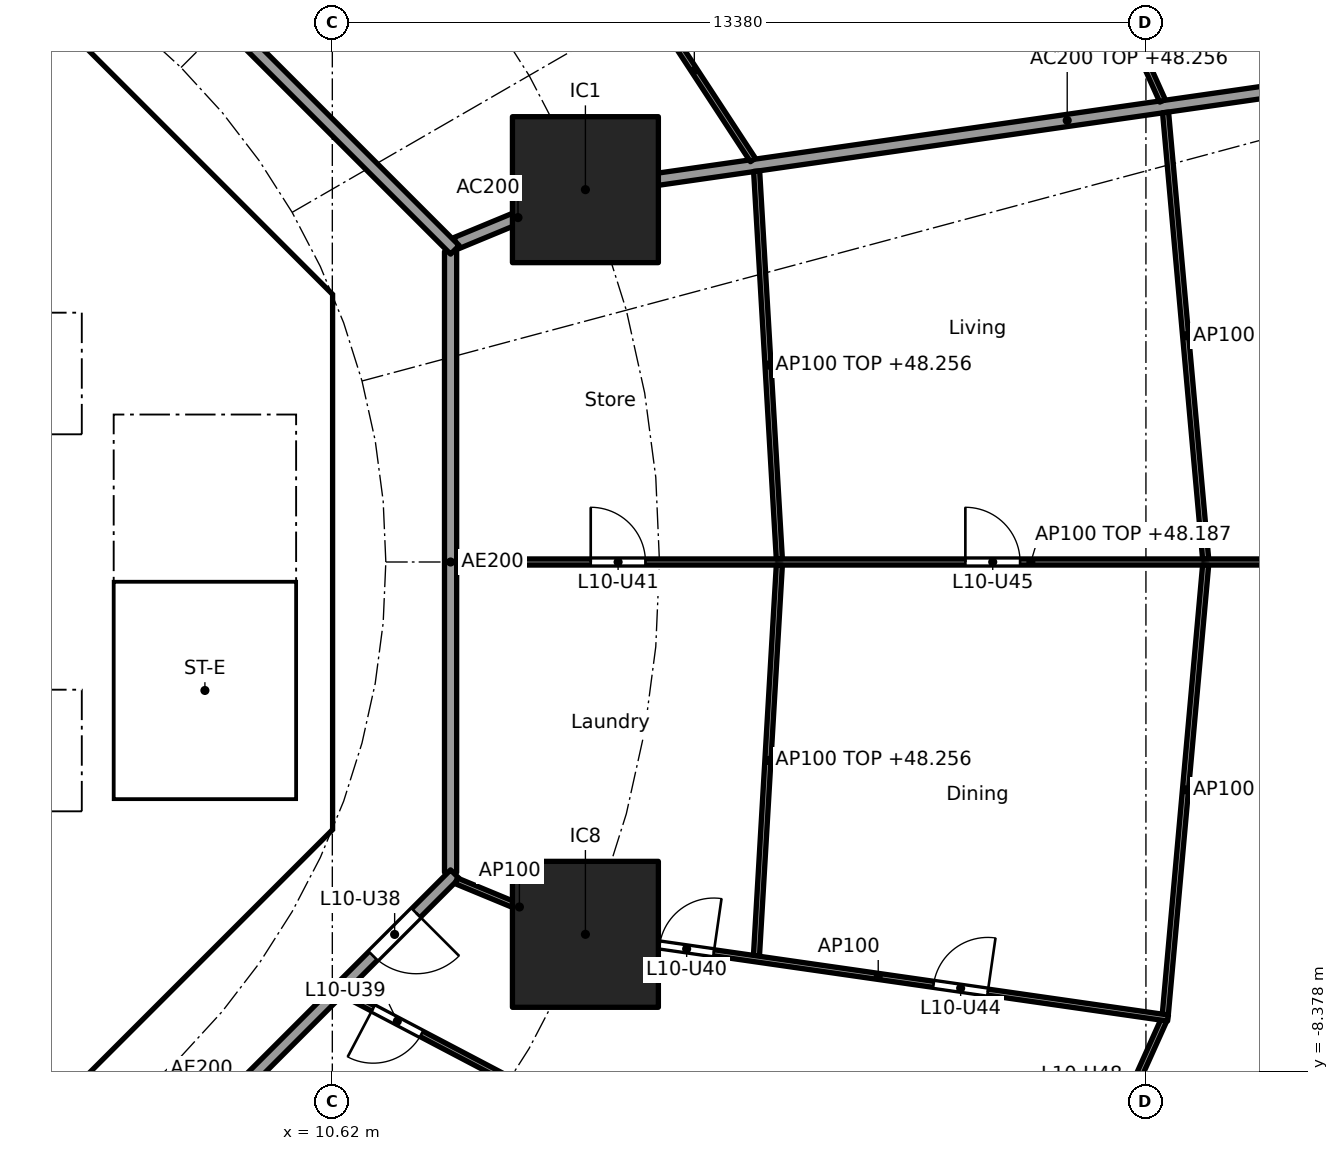
"""IFC4 building model, lengths in metres.
Left out: names, types, materials, properties, quantities, classifications, styles, units other than length and angle.
Written with IfcOpenShell. Run it as: python <this file> out.ifc"""

import sys

from ifc_helpers import new_model, si_unit, direction, frame, frame_2d, origin, origin_2d, place, context, subcontext, project, spatial, polyline, rectangle, outline, extrude, element, fill, save


model = new_model("IFC4")
c1 = context("Model", 3, precision=1e-05, world=origin(), true_north=direction((0.0, 1.0)))
c2 = subcontext(c1, "Body", "Model", "MODEL_VIEW")
j1 = project(units=[si_unit("LENGTHUNIT", "METRE"), si_unit("PLANEANGLEUNIT", "RADIAN")], contexts=[c1])
p1 = place(None, origin())
s1 = spatial("IfcSite", under=j1, at=p1, CompositionType="ELEMENT")
p2 = place(p1, origin())
s2 = spatial("IfcBuilding", under=s1, at=p2, CompositionType="ELEMENT")
p3 = place(p2, frame((0.0, 0.0, 45.5)))
s3 = spatial("IfcBuildingStorey", under=s2, at=p3, CompositionType="ELEMENT", Elevation=45.5)
for number, where, z_axis, x_axis in (
    (1, (14.782, 6.123, 0.0), (0.0, 0.0, 1.0), (1.0, 0.0, 0.0)),
    (2, (14.782, -6.123, 0.0), (0.0, 0.0, 1.0), (1.0, 0.0, 0.0)),
):
    element("IfcColumn", number, at=place(p3, frame(where, z_axis=z_axis, x_axis=x_axis)), inside=s3, PredefinedType="COLUMN", context=c2, shape_type="SweptSolid", body=[
        extrude(rectangle(XDim=2.4, YDim=2.4, at=origin_2d()), origin(), (0.0, 0.0, 1.0), 3.7),
    ])
p4 = place(p3, frame((9.988, 4.613, 0.0), z_axis=(0.0, 0.0, 1.0), x_axis=(-0.707106781187, 0.707106781187, 0.0)))
e3 = element("IfcWall", 3, at=p4, inside=s3, PredefinedType="SHEAR", context=c2, shape_type="SweptSolid", body=[
    extrude(rectangle(XDim=7.602, YDim=0.6, at=frame_2d((3.801, 0.0))), origin(), (0.0, 0.0, 1.0), 3.44),
])
p5 = place(p4, frame((3.201, 0.0, 0.0)))
e4 = element("IfcOpeningElement", 4, at=p5, cuts=e3, PredefinedType="OPENING", context=c2, shape_type="SweptSolid", body=[
    extrude(rectangle(XDim=1.2, YDim=2.1, at=frame_2d((0.6, 1.05))), frame((0.0, 0.31, 0.0), z_axis=(0.0, -1.0, 0.0), x_axis=(1.0, 0.0, 0.0)), (0.0, 0.0, 1.0), 0.62),
])
p6 = place(p3, frame((4.613, -9.988, 0.0), z_axis=(0.0, 0.0, 1.0), x_axis=(0.707106781187, 0.707106781187, 0.0)))
e5 = element("IfcWall", 5, at=p6, inside=s3, PredefinedType="SHEAR", context=c2, shape_type="SweptSolid", body=[
    extrude(rectangle(XDim=7.602, YDim=0.6, at=frame_2d((3.801, 0.0))), origin(), (0.0, 0.0, 1.0), 3.44),
])
p7 = place(p6, frame((3.201, 0.0, 0.0)))
e6 = element("IfcOpeningElement", 6, at=p7, cuts=e5, PredefinedType="OPENING", context=c2, shape_type="SweptSolid", body=[
    extrude(rectangle(XDim=1.2, YDim=2.1, at=frame_2d((0.6, 1.05))), frame((0.0, 0.31, 0.0), z_axis=(0.0, -1.0, 0.0), x_axis=(1.0, 0.0, 0.0)), (0.0, 0.0, 1.0), 0.62),
])
p8 = place(p3, frame((-6.7, 2.0, 0.0), z_axis=(0.0, 0.0, 1.0), x_axis=(1.0, 0.0, 0.0)))
e7 = element("IfcWall", 7, at=p8, inside=s3, PredefinedType="SOLIDWALL", context=c2, shape_type="SweptSolid", body=[
    extrude(rectangle(XDim=13.4, YDim=0.2, at=frame_2d((6.7, 0.0))), origin(), (0.0, 0.0, 1.0), 3.44),
])
p9 = place(p8, frame((0.65, 0.0, 0.0)))
e8 = element("IfcOpeningElement", 8, at=p9, cuts=e7, PredefinedType="OPENING", context=c2, shape_type="SweptSolid", body=[
    extrude(rectangle(XDim=1.1, YDim=2.1, at=frame_2d((0.55, 1.05))), frame((0.0, 0.11, 0.0), z_axis=(0.0, -1.0, 0.0), x_axis=(1.0, 0.0, 0.0)), (0.0, 0.0, 1.0), 0.22),
])
p10 = place(p8, frame((2.85, 0.0, 0.0)))
e9 = element("IfcOpeningElement", 9, at=p10, cuts=e7, PredefinedType="OPENING", context=c2, shape_type="SweptSolid", body=[
    extrude(rectangle(XDim=1.1, YDim=2.1, at=frame_2d((0.55, 1.05))), frame((0.0, 0.11, 0.0), z_axis=(0.0, -1.0, 0.0), x_axis=(1.0, 0.0, 0.0)), (0.0, 0.0, 1.0), 0.22),
])
p11 = place(p8, frame((5.05, 0.0, 0.0)))
e10 = element("IfcOpeningElement", 10, at=p11, cuts=e7, PredefinedType="OPENING", context=c2, shape_type="SweptSolid", body=[
    extrude(rectangle(XDim=1.1, YDim=2.1, at=frame_2d((0.55, 1.05))), frame((0.0, 0.11, 0.0), z_axis=(0.0, -1.0, 0.0), x_axis=(1.0, 0.0, 0.0)), (0.0, 0.0, 1.0), 0.22),
])
p12 = place(p3, frame((6.7, 4.0, 0.0), z_axis=(0.0, 0.0, 1.0), x_axis=(1.0, 0.0, 0.0)))
e11 = element("IfcWall", 11, at=p12, inside=s3, PredefinedType="SOLIDWALL", context=c2, shape_type="SweptSolid", body=[
    extrude(rectangle(XDim=3.325, YDim=0.2, at=frame_2d((1.662, 0.0))), origin(), (0.0, 0.0, 1.0), 3.44),
])
p13 = place(p12, frame((1.25, 0.0, 0.0)))
e12 = element("IfcOpeningElement", 12, at=p13, cuts=e11, PredefinedType="OPENING", context=c2, shape_type="SweptSolid", body=[
    extrude(rectangle(XDim=1.1, YDim=2.1, at=frame_2d((0.55, 1.05))), frame((0.0, 0.11, 0.0), z_axis=(0.0, -1.0, 0.0), x_axis=(1.0, 0.0, 0.0)), (0.0, 0.0, 1.0), 0.22),
])
p14 = place(p3, frame((-6.7, -2.0, 0.0), z_axis=(0.0, 0.0, 1.0), x_axis=(1.0, 0.0, 0.0)))
e13 = element("IfcWall", 13, at=p14, inside=s3, PredefinedType="SOLIDWALL", context=c2, shape_type="SweptSolid", body=[
    extrude(rectangle(XDim=13.4, YDim=0.2, at=frame_2d((6.7, 0.0))), origin(), (0.0, 0.0, 1.0), 3.44),
])
p15 = place(p14, frame((0.65, 0.0, 0.0)))
e14 = element("IfcOpeningElement", 14, at=p15, cuts=e13, PredefinedType="OPENING", context=c2, shape_type="SweptSolid", body=[
    extrude(rectangle(XDim=1.1, YDim=2.1, at=frame_2d((0.55, 1.05))), frame((0.0, 0.11, 0.0), z_axis=(0.0, -1.0, 0.0), x_axis=(1.0, 0.0, 0.0)), (0.0, 0.0, 1.0), 0.22),
])
p16 = place(p14, frame((2.85, 0.0, 0.0)))
e15 = element("IfcOpeningElement", 15, at=p16, cuts=e13, PredefinedType="OPENING", context=c2, shape_type="SweptSolid", body=[
    extrude(rectangle(XDim=1.1, YDim=2.1, at=frame_2d((0.55, 1.05))), frame((0.0, 0.11, 0.0), z_axis=(0.0, -1.0, 0.0), x_axis=(1.0, 0.0, 0.0)), (0.0, 0.0, 1.0), 0.22),
])
p17 = place(p3, origin())
e16 = element("IfcWall", 16, at=p17, inside=s3, PredefinedType="SHEAR", context=c2, shape_type="SweptSolid", body=[
    extrude(outline(polyline([(9.776, -4.401), (10.025, -4.152), (10.025, -3.801), (10.025, 4.152), (9.776, 4.401), (10.2, 4.825), (10.625, 4.401), (10.625, -4.401), (10.2, -4.825), (9.776, -4.401)])), origin(), (0.0, 0.0, 1.0), 3.44),
])
p18 = place(p3, origin())
e17 = element("IfcWall", 17, at=p18, inside=s3, PredefinedType="SOLIDWALL", context=c2, shape_type="SweptSolid", body=[
    extrude(outline(polyline([(-6.7, -2.1), (-6.5, -2.1), (-6.5, -4.1), (-4.5, -4.1), (-4.5, -2.1), (-4.3, -2.1), (-4.3, -4.1), (-2.3, -4.1), (-2.3, -2.1), (-2.1, -2.1), (-2.1, -4.1), (-0.1, -4.1), (-0.1, -2.1), (0.1, -2.1), (0.1, -4.1), (2.1, -4.1), (2.1, -2.1), (2.3, -2.1), (2.3, -4.1), (4.3, -4.1), (4.3, -2.1), (4.5, -2.1), (4.5, -4.1), (6.5, -4.1), (6.5, -2.1), (6.7, -2.1), (6.7, -4.3), (-6.7, -4.3), (-6.7, -2.1)])), origin(), (0.0, 0.0, 1.0), 3.44),
])
p19 = place(p3, origin())
e18 = element("IfcWall", 18, at=p19, inside=s3, PredefinedType="SOLIDWALL", context=c2, shape_type="SweptSolid", body=[
    extrude(outline(polyline([(-6.5, 2.1), (-6.7, 2.1), (-6.7, 4.3), (6.7, 4.3), (6.7, 2.1), (6.5, 2.1), (6.5, 4.1), (4.5, 4.1), (4.5, 2.1), (4.3, 2.1), (4.3, 4.1), (2.3, 4.1), (2.3, 2.1), (2.1, 2.1), (2.1, 4.1), (0.1, 4.1), (0.1, 2.1), (-0.1, 2.1), (-0.1, 4.1), (-2.1, 4.1), (-2.1, 2.1), (-2.3, 2.1), (-2.3, 4.1), (-4.3, 4.1), (-4.3, 2.1), (-4.5, 2.1), (-4.5, 4.1), (-6.5, 4.1), (-6.5, 2.1)])), origin(), (0.0, 0.0, 1.0), 3.44),
])
p20 = place(p3, origin())
e19 = element("IfcWall", 19, at=p20, inside=s3, PredefinedType="SOLIDWALL", context=c2, shape_type="SweptSolid", body=[
    extrude(outline(polyline([(7.025, -3.9), (6.7, -3.9), (6.7, 3.9), (7.025, 3.9), (7.025, -3.9)])), origin(), (0.0, 0.0, 1.0), 3.44),
])
p21 = place(p3, origin())
e20 = element("IfcWall", 20, at=p21, inside=s3, PredefinedType="SOLIDWALL", context=c2, shape_type="SweptSolid", body=[
    extrude(outline(polyline([(10.025, -4.1), (6.7, -4.1), (6.7, -3.9), (10.025, -3.9), (10.025, -4.1)])), origin(), (0.0, 0.0, 1.0), 3.44),
])
p22 = place(p3, frame((12.657, 5.243, 0.0), z_axis=(0.0, 0.0, 1.0), x_axis=(0.923853160736, 0.382747093259, 0.0)))
e21 = element("IfcWall", 21, at=p22, inside=s3, PredefinedType="PARTITIONING", context=c2, shape_type="SweptSolid", body=[
    extrude(rectangle(XDim=2.2, YDim=0.2, at=frame_2d((1.1, 0.0))), origin(), (0.0, 0.0, 1.0), 3.44),
])
p23 = place(p3, frame((14.832, 6.13, 0.0), z_axis=(0.0, 0.0, 1.0), x_axis=(0.989836541293, 0.142209779978, 0.0)))
e22 = element("IfcWall", 22, at=p23, inside=s3, PredefinedType="PARTITIONING", context=c2, shape_type="SweptSolid", body=[
    extrude(rectangle(XDim=15.909, YDim=0.2, at=frame_2d((7.955, 0.0))), origin(), (0.0, 0.0, 1.0), 2.756),
])
p24 = place(p3, frame((12.565, -5.104, 0.0), z_axis=(0.0, 0.0, 1.0), x_axis=(0.0, 1.0, 0.0)))
e23 = element("IfcWall", 23, at=p24, inside=s3, PredefinedType="PARTITIONING", context=c2, shape_type="SweptSolid", body=[
    extrude(rectangle(XDim=10.209, YDim=0.2, at=frame_2d((5.104, 0.0))), origin(), (0.0, 0.0, 1.0), 3.44),
])
p25 = place(p3, frame((12.635, 5.134, 0.0), z_axis=(0.0, 0.0, 1.0), x_axis=(-0.707106781187, 0.707106781187, 0.0)))
e24 = element("IfcWall", 24, at=p25, inside=s3, PredefinedType="PARTITIONING", context=c2, shape_type="SweptSolid", body=[
    extrude(rectangle(XDim=10.609, YDim=0.2, at=frame_2d((5.305, 0.0))), origin(), (0.0, 0.0, 1.0), 3.44),
])
p26 = place(p3, frame((5.275, -12.494, 0.0), z_axis=(0.0, 0.0, 1.0), x_axis=(0.707106781187, 0.707106781187, 0.0)))
e25 = element("IfcWall", 25, at=p26, inside=s3, PredefinedType="PARTITIONING", context=c2, shape_type="SweptSolid", body=[
    extrude(rectangle(XDim=10.409, YDim=0.2, at=frame_2d((5.205, 0.0))), origin(), (0.0, 0.0, 1.0), 3.44),
])
p27 = place(p26, frame((8.508, 0.0, 0.0)))
e26 = element("IfcOpeningElement", 26, at=p27, cuts=e25, PredefinedType="OPENING", context=c2, shape_type="SweptSolid", body=[
    extrude(rectangle(XDim=1.0, YDim=2.1, at=frame_2d((0.5, 1.05))), frame((0.0, 0.11, 0.0), z_axis=(0.0, -1.0, 0.0), x_axis=(1.0, 0.0, 0.0)), (0.0, 0.0, 1.0), 0.22),
])
p28 = place(p3, frame((12.665, 0.0, 0.0), z_axis=(0.0, 0.0, 1.0), x_axis=(1.0, 0.0, 0.0)))
e27 = element("IfcWall", 27, at=p28, inside=s3, PredefinedType="PARTITIONING", context=c2, shape_type="SweptSolid", body=[
    extrude(rectangle(XDim=18.885, YDim=0.1, at=frame_2d((9.443, 0.0))), origin(), (0.0, 0.0, 1.0), 2.687),
])
p29 = place(p28, frame((2.205, 0.0, 0.0)))
e28 = element("IfcOpeningElement", 28, at=p29, cuts=e27, PredefinedType="OPENING", context=c2, shape_type="SweptSolid", body=[
    extrude(rectangle(XDim=0.9, YDim=2.1, at=frame_2d((0.45, 1.05))), frame((0.0, 0.06, 0.0), z_axis=(0.0, -1.0, 0.0), x_axis=(1.0, 0.0, 0.0)), (0.0, 0.0, 1.0), 0.12),
])
p30 = place(p28, frame((8.366, 0.0, 0.0)))
e29 = element("IfcOpeningElement", 29, at=p30, cuts=e27, PredefinedType="OPENING", context=c2, shape_type="SweptSolid", body=[
    extrude(rectangle(XDim=0.9, YDim=2.1, at=frame_2d((0.45, 1.05))), frame((0.0, 0.06, 0.0), z_axis=(0.0, -1.0, 0.0), x_axis=(1.0, 0.0, 0.0)), (0.0, 0.0, 1.0), 0.12),
])
p31 = place(p28, frame((15.154, 0.0, 0.0)))
e30 = element("IfcOpeningElement", 30, at=p31, cuts=e27, PredefinedType="OPENING", context=c2, shape_type="SweptSolid", body=[
    extrude(rectangle(XDim=0.9, YDim=2.1, at=frame_2d((0.45, 1.05))), frame((0.0, 0.06, 0.0), z_axis=(0.0, -1.0, 0.0), x_axis=(1.0, 0.0, 0.0)), (0.0, 0.0, 1.0), 0.12),
])
p32 = place(p3, frame((17.971, 0.05, 0.0), z_axis=(0.0, 0.0, 1.0), x_axis=(-0.058513659907, 0.998286607946, 0.0)))
e31 = element("IfcWall", 31, at=p32, inside=s3, PredefinedType="PARTITIONING", context=c2, shape_type="SweptSolid", body=[
    extrude(rectangle(XDim=6.388, YDim=0.1, at=frame_2d((3.194, 0.0))), origin(), (0.0, 0.0, 1.0), 2.756),
])
p33 = place(p3, frame((17.971, -0.05, 0.0), z_axis=(0.0, 0.0, 1.0), x_axis=(-0.058475267553, -0.998288857538, 0.0)))
e32 = element("IfcWall", 32, at=p33, inside=s3, PredefinedType="PARTITIONING", context=c2, shape_type="SweptSolid", body=[
    extrude(rectangle(XDim=6.438, YDim=0.1, at=frame_2d((3.219, 0.0))), origin(), (0.0, 0.0, 1.0), 2.756),
])
p34 = place(p3, frame((24.982, 0.05, 0.0), z_axis=(0.0, 0.0, 1.0), x_axis=(-0.08944290521, 0.995991951126, 0.0)))
e33 = element("IfcWall", 33, at=p34, inside=s3, PredefinedType="PARTITIONING", context=c2, shape_type="SweptSolid", body=[
    extrude(rectangle(XDim=7.373, YDim=0.1, at=frame_2d((3.686, 0.0))), origin(), (0.0, 0.0, 1.0), 2.756),
])
p35 = place(p3, frame((24.982, -0.05, 0.0), z_axis=(0.0, 0.0, 1.0), x_axis=(-0.089432471274, -0.995992888068, 0.0)))
e34 = element("IfcWall", 34, at=p35, inside=s3, PredefinedType="PARTITIONING", context=c2, shape_type="SweptSolid", body=[
    extrude(rectangle(XDim=7.423, YDim=0.1, at=frame_2d((3.711, 0.0))), origin(), (0.0, 0.0, 1.0), 2.756),
])
p36 = place(p3, frame((17.537, 6.61, 0.0), z_axis=(0.0, 0.0, 1.0), x_axis=(-0.547637987196, 0.836715384692, 0.0)))
e35 = element("IfcWall", 35, at=p36, inside=s3, PredefinedType="PARTITIONING", context=c2, shape_type="SweptSolid", body=[
    extrude(rectangle(XDim=3.52, YDim=0.1, at=frame_2d((1.76, 0.0))), origin(), (0.0, 0.0, 1.0), 2.756),
])
p37 = place(p3, frame((24.273, 7.584, 0.0), z_axis=(0.0, 0.0, 1.0), x_axis=(-0.410201529109, 0.911994904326, 0.0)))
e36 = element("IfcWall", 36, at=p37, inside=s3, PredefinedType="PARTITIONING", context=c2, shape_type="SweptSolid", body=[
    extrude(rectangle(XDim=5.787, YDim=0.1, at=frame_2d((2.894, 0.0))), origin(), (0.0, 0.0, 1.0), 2.756),
])
p38 = place(p37, frame((2.444, 0.0, 0.0)))
e37 = element("IfcOpeningElement", 37, at=p38, cuts=e36, PredefinedType="OPENING", context=c2, shape_type="SweptSolid", body=[
    extrude(rectangle(XDim=0.9, YDim=2.1, at=frame_2d((0.45, 1.05))), frame((0.0, 0.06, 0.0), z_axis=(0.0, -1.0, 0.0), x_axis=(1.0, 0.0, 0.0)), (0.0, 0.0, 1.0), 0.12),
])
p39 = place(p3, frame((10.813, -7.091, 0.0), z_axis=(0.0, 0.0, 1.0), x_axis=(0.885182649479, -0.465243674928, 0.0)))
e38 = element("IfcWall", 38, at=p39, inside=s3, PredefinedType="PARTITIONING", context=c2, shape_type="SweptSolid", body=[
    extrude(rectangle(XDim=12.551, YDim=0.1, at=frame_2d((6.275, 0.0))), origin(), (0.0, 0.0, 1.0), 2.687),
])
p40 = place(p39, frame((0.539, 0.0, 0.0)))
e39 = element("IfcOpeningElement", 39, at=p40, cuts=e38, PredefinedType="OPENING", context=c2, shape_type="SweptSolid", body=[
    extrude(rectangle(XDim=0.9, YDim=2.1, at=frame_2d((0.45, 1.05))), frame((0.0, 0.06, 0.0), z_axis=(0.0, -1.0, 0.0), x_axis=(1.0, 0.0, 0.0)), (0.0, 0.0, 1.0), 0.12),
])
p41 = place(p39, frame((8.494, 0.0, 0.0)))
e40 = element("IfcOpeningElement", 40, at=p41, cuts=e38, PredefinedType="OPENING", context=c2, shape_type="SweptSolid", body=[
    extrude(rectangle(XDim=0.9, YDim=2.1, at=frame_2d((0.45, 1.05))), frame((0.0, 0.06, 0.0), z_axis=(0.0, -1.0, 0.0), x_axis=(1.0, 0.0, 0.0)), (0.0, 0.0, 1.0), 0.12),
])
p42 = place(p3, frame((21.899, -12.861, 0.0), z_axis=(0.0, 0.0, 1.0), x_axis=(0.410197710154, 0.911996622025, 0.0)))
e41 = element("IfcWall", 41, at=p42, inside=s3, PredefinedType="PARTITIONING", context=c2, shape_type="SweptSolid", body=[
    extrude(rectangle(XDim=5.837, YDim=0.1, at=frame_2d((2.918, 0.0))), origin(), (0.0, 0.0, 1.0), 2.756),
])
p43 = place(p42, frame((3.928, 0.0, 0.0)))
e42 = element("IfcOpeningElement", 42, at=p43, cuts=e41, PredefinedType="OPENING", context=c2, shape_type="SweptSolid", body=[
    extrude(rectangle(XDim=0.9, YDim=2.1, at=frame_2d((0.45, 1.05))), frame((0.0, 0.06, 0.0), z_axis=(0.0, -1.0, 0.0), x_axis=(1.0, 0.0, 0.0)), (0.0, 0.0, 1.0), 0.12),
])
p44 = place(p3, frame((12.657, -5.243, 0.0), z_axis=(0.0, 0.0, 1.0), x_axis=(0.923864733477, -0.382719158442, 0.0)))
e43 = element("IfcWall", 43, at=p44, inside=s3, PredefinedType="PARTITIONING", context=c2, shape_type="SweptSolid", body=[
    extrude(rectangle(XDim=2.25, YDim=0.1, at=frame_2d((1.125, 0.0))), origin(), (0.0, 0.0, 1.0), 3.44),
])
p45 = place(p3, frame((14.832, -6.13, 0.0), z_axis=(0.0, 0.0, 1.0), x_axis=(0.989837122016, -0.142205737856, 0.0)))
e44 = element("IfcWall", 44, at=p45, inside=s3, PredefinedType="PARTITIONING", context=c2, shape_type="SweptSolid", body=[
    extrude(rectangle(XDim=9.63, YDim=0.1, at=frame_2d((4.815, 0.0))), origin(), (0.0, 0.0, 1.0), 3.44),
])
p46 = place(p45, frame((1.182, 0.0, 0.0)))
e45 = element("IfcOpeningElement", 45, at=p46, cuts=e44, PredefinedType="OPENING", context=c2, shape_type="SweptSolid", body=[
    extrude(rectangle(XDim=0.9, YDim=2.1, at=frame_2d((0.45, 1.05))), frame((0.0, 0.06, 0.0), z_axis=(0.0, -1.0, 0.0), x_axis=(1.0, 0.0, 0.0)), (0.0, 0.0, 1.0), 0.12),
])
p47 = place(p45, frame((5.734, 0.0, 0.0)))
e46 = element("IfcOpeningElement", 46, at=p47, cuts=e44, PredefinedType="OPENING", context=c2, shape_type="SweptSolid", body=[
    extrude(rectangle(XDim=0.9, YDim=2.1, at=frame_2d((0.45, 1.05))), frame((0.0, 0.06, 0.0), z_axis=(0.0, -1.0, 0.0), x_axis=(1.0, 0.0, 0.0)), (0.0, 0.0, 1.0), 0.12),
])
p48 = place(p13, frame((1.1, 0.0, 0.0), x_axis=(-1.0, 0.0, 0.0)))
e47 = element("IfcDoor", 47, at=p48, inside=s3, OperationType="SINGLE_SWING_RIGHT", PredefinedType="DOOR", context=c2, shape_type="SweptSolid", body=[
    extrude(rectangle(XDim=1.1, YDim=2.1, at=frame_2d((0.55, 1.05))), frame((0.0, 0.025, 0.0), z_axis=(0.0, -1.0, 0.0), x_axis=(1.0, 0.0, 0.0)), (0.0, 0.0, 1.0), 0.05),
])
fill(e12, e47)
p49 = place(p5, origin())
e48 = element("IfcDoor", 48, at=p49, inside=s3, OperationType="SINGLE_SWING_RIGHT", PredefinedType="DOOR", context=c2, shape_type="SweptSolid", body=[
    extrude(rectangle(XDim=1.2, YDim=2.1, at=frame_2d((0.6, 1.05))), frame((0.0, 0.025, 0.0), z_axis=(0.0, -1.0, 0.0), x_axis=(1.0, 0.0, 0.0)), (0.0, 0.0, 1.0), 0.05),
])
fill(e4, e48)
p50 = place(p7, origin())
e49 = element("IfcDoor", 49, at=p50, inside=s3, OperationType="SINGLE_SWING_RIGHT", PredefinedType="DOOR", context=c2, shape_type="SweptSolid", body=[
    extrude(rectangle(XDim=1.2, YDim=2.1, at=frame_2d((0.6, 1.05))), frame((0.0, 0.025, 0.0), z_axis=(0.0, -1.0, 0.0), x_axis=(1.0, 0.0, 0.0)), (0.0, 0.0, 1.0), 0.05),
])
fill(e6, e49)
p51 = place(p27, frame((1.0, 0.0, 0.0), x_axis=(-1.0, 0.0, 0.0)))
e50 = element("IfcDoor", 50, at=p51, inside=s3, OperationType="SINGLE_SWING_LEFT", PredefinedType="DOOR", context=c2, shape_type="SweptSolid", body=[
    extrude(rectangle(XDim=1.0, YDim=2.1, at=frame_2d((0.5, 1.05))), frame((0.0, 0.025, 0.0), z_axis=(0.0, -1.0, 0.0), x_axis=(1.0, 0.0, 0.0)), (0.0, 0.0, 1.0), 0.05),
])
fill(e26, e50)
p52 = place(p40, frame((0.9, 0.0, 0.0), x_axis=(-1.0, 0.0, 0.0)))
e51 = element("IfcDoor", 51, at=p52, inside=s3, OperationType="SINGLE_SWING_RIGHT", PredefinedType="DOOR", context=c2, shape_type="SweptSolid", body=[
    extrude(rectangle(XDim=0.9, YDim=2.1, at=frame_2d((0.45, 1.05))), frame((0.0, 0.025, 0.0), z_axis=(0.0, -1.0, 0.0), x_axis=(1.0, 0.0, 0.0)), (0.0, 0.0, 1.0), 0.05),
])
fill(e39, e51)
p53 = place(p46, origin())
e52 = element("IfcDoor", 52, at=p53, inside=s3, OperationType="SINGLE_SWING_RIGHT", PredefinedType="DOOR", context=c2, shape_type="SweptSolid", body=[
    extrude(rectangle(XDim=0.9, YDim=2.1, at=frame_2d((0.45, 1.05))), frame((0.0, 0.025, 0.0), z_axis=(0.0, -1.0, 0.0), x_axis=(1.0, 0.0, 0.0)), (0.0, 0.0, 1.0), 0.05),
])
fill(e45, e52)
p54 = place(p29, origin())
e53 = element("IfcDoor", 53, at=p54, inside=s3, OperationType="SINGLE_SWING_LEFT", PredefinedType="DOOR", context=c2, shape_type="SweptSolid", body=[
    extrude(rectangle(XDim=0.9, YDim=2.1, at=frame_2d((0.45, 1.05))), frame((0.0, 0.025, 0.0), z_axis=(0.0, -1.0, 0.0), x_axis=(1.0, 0.0, 0.0)), (0.0, 0.0, 1.0), 0.05),
])
fill(e28, e53)
p55 = place(p47, origin())
e54 = element("IfcDoor", 54, at=p55, inside=s3, OperationType="SINGLE_SWING_RIGHT", PredefinedType="DOOR", context=c2, shape_type="SweptSolid", body=[
    extrude(rectangle(XDim=0.9, YDim=2.1, at=frame_2d((0.45, 1.05))), frame((0.0, 0.025, 0.0), z_axis=(0.0, -1.0, 0.0), x_axis=(1.0, 0.0, 0.0)), (0.0, 0.0, 1.0), 0.05),
])
fill(e46, e54)
p56 = place(p30, origin())
e55 = element("IfcDoor", 55, at=p56, inside=s3, OperationType="SINGLE_SWING_LEFT", PredefinedType="DOOR", context=c2, shape_type="SweptSolid", body=[
    extrude(rectangle(XDim=0.9, YDim=2.1, at=frame_2d((0.45, 1.05))), frame((0.0, 0.025, 0.0), z_axis=(0.0, -1.0, 0.0), x_axis=(1.0, 0.0, 0.0)), (0.0, 0.0, 1.0), 0.05),
])
fill(e29, e55)
save(model, sys.argv[1])
